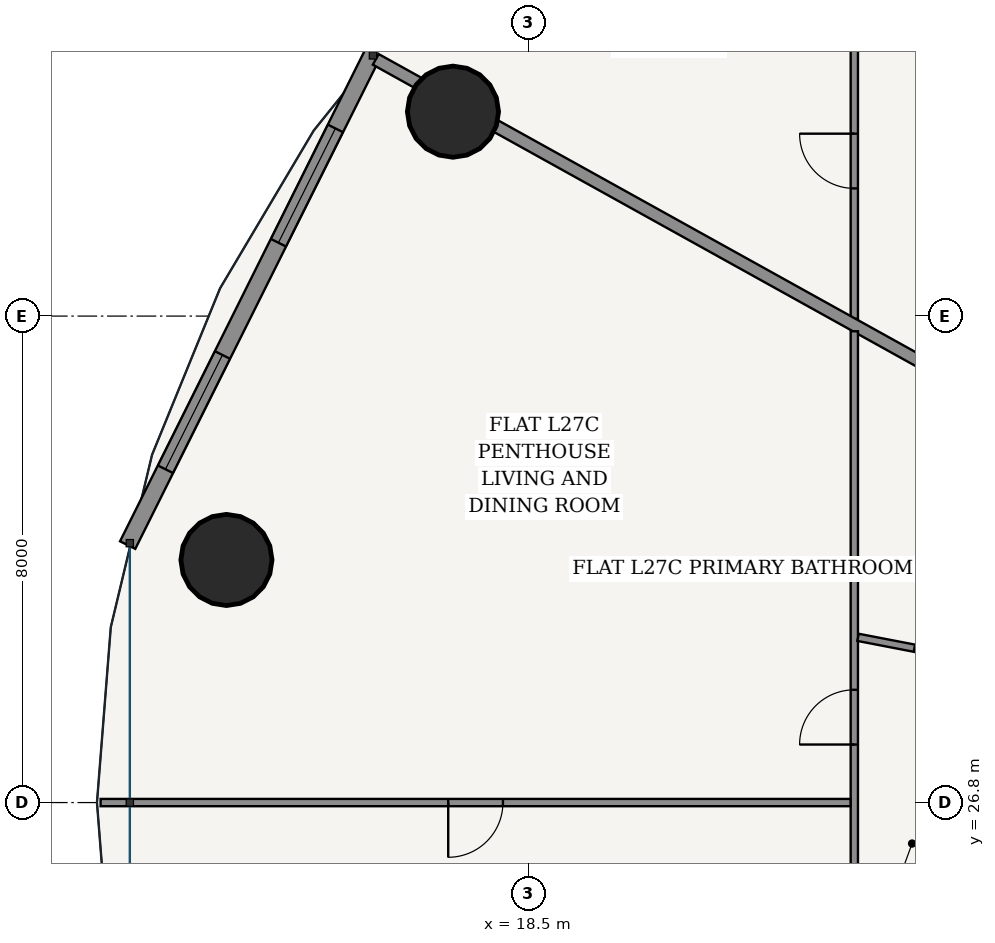
"""IFC4 building model, lengths in metres.
Left out: names, types, materials, properties, quantities, classifications, styles, units other than length and angle.
Written with IfcOpenShell. Run it as: python <this file> out.ifc"""

import sys

from ifc_helpers import new_model, si_unit, direction, frame, frame_2d, origin, origin_2d, place, context, subcontext, project, spatial, rectangle, hollow_circle, extrude, source, transform, mapped, element, fill, save


model = new_model("IFC4")
c1 = context("Model", 3, precision=1e-05, world=origin(), true_north=direction((-0.2419218956, 0.970295726276)))
c2 = subcontext(c1, "Body", "Model", "MODEL_VIEW")
j1 = project(units=[si_unit("LENGTHUNIT", "METRE"), si_unit("PLANEANGLEUNIT", "RADIAN")], contexts=[c1])
p1 = place(None, origin())
s1 = spatial("IfcSite", under=j1, at=p1, CompositionType="ELEMENT")
p2 = place(p1, origin())
s2 = spatial("IfcBuilding", under=s1, at=p2, CompositionType="ELEMENT")
p3 = place(p2, frame((0.0, 0.0, 105.0)))
s3 = spatial("IfcBuildingStorey", under=s2, at=p3, CompositionType="ELEMENT", Elevation=105.0)
for number, where, z_axis, x_axis in (
    (1, (17.255, 38.161, 0.0), (0.0, 0.0, 1.0), (1.0, 0.0, 0.0)),
    (2, (13.529, 30.79, 0.0), (0.0, 0.0, 1.0), (1.0, 0.0, 0.0)),
):
    element("IfcColumn", number, at=place(p3, frame(where, z_axis=z_axis, x_axis=x_axis)), inside=s3, PredefinedType="COLUMN", context=c2, shape_type="SweptSolid", body=[
        extrude(hollow_circle(Radius=0.75, WallThickness=0.045, at=origin_2d()), origin(), (0.0, 0.0, 1.0), 3.6),
    ])
p4 = place(p3, frame((15.944, 39.133, 0.0), z_axis=(0.0, 0.0, 1.0), x_axis=(-0.446263788661, -0.894901464369, 0.0)))
e3 = element("IfcWall", 3, at=p4, inside=s3, PredefinedType="SOLIDWALL", context=c2, shape_type="SweptSolid", body=[
    extrude(rectangle(XDim=9.05, YDim=0.28, at=frame_2d((4.525, 0.0))), origin(), (0.0, 0.0, 1.0), 3.325),
])
p5 = place(p4, frame((1.394, 0.0, 0.85)))
e4 = element("IfcOpeningElement", 4, at=p5, cuts=e3, PredefinedType="OPENING", context=c2, shape_type="SweptSolid", body=[
    extrude(rectangle(XDim=2.1, YDim=1.95, at=frame_2d((1.05, 0.975))), frame((0.0, 0.15, 0.0), z_axis=(0.0, -1.0, 0.0), x_axis=(1.0, 0.0, 0.0)), (0.0, 0.0, 1.0), 0.3),
])
p6 = place(p4, frame((5.557, 0.0, 0.85)))
e5 = element("IfcOpeningElement", 5, at=p6, cuts=e3, PredefinedType="OPENING", context=c2, shape_type="SweptSolid", body=[
    extrude(rectangle(XDim=2.1, YDim=1.95, at=frame_2d((1.05, 0.975))), frame((0.0, 0.15, 0.0), z_axis=(0.0, -1.0, 0.0), x_axis=(1.0, 0.0, 0.0)), (0.0, 0.0, 1.0), 0.3),
])
p7 = place(p3, frame((23.855, 34.754, 0.0), z_axis=(0.0, 0.0, 1.0), x_axis=(0.0, 1.0, 0.0)))
e6 = element("IfcWall", 6, at=p7, inside=s3, PredefinedType="PARTITIONING", context=c2, shape_type="SweptSolid", body=[
    extrude(rectangle(XDim=5.191, YDim=0.12, at=frame_2d((2.595, 0.0))), origin(), (0.0, 0.0, 1.0), 3.004),
])
p8 = place(p7, frame((2.145, 0.0, 0.0)))
e7 = element("IfcOpeningElement", 7, at=p8, cuts=e6, PredefinedType="OPENING", context=c2, shape_type="SweptSolid", body=[
    extrude(rectangle(XDim=0.9, YDim=2.15, at=frame_2d((0.45, 1.075))), frame((0.0, 0.07, 0.0), z_axis=(0.0, -1.0, 0.0), x_axis=(1.0, 0.0, 0.0)), (0.0, 0.0, 1.0), 0.14),
])
p9 = place(p3, frame((26.615, 33.12, 0.0), z_axis=(0.0, 0.0, 1.0), x_axis=(-0.874319192772, 0.485351366692, 0.0)))
e8 = element("IfcWall", 8, at=p9, inside=s3, PredefinedType="PARTITIONING", context=c2, shape_type="SweptSolid", body=[
    extrude(rectangle(XDim=12.158, YDim=0.2, at=frame_2d((6.079, 0.0))), origin(), (0.0, 0.0, 1.0), 2.767),
])
p10 = place(p3, frame((23.855, 19.05, 0.0), z_axis=(0.0, 0.0, 1.0), x_axis=(0.0, 1.0, 0.0)))
e9 = element("IfcWall", 9, at=p10, inside=s3, PredefinedType="PARTITIONING", context=c2, shape_type="SweptSolid", body=[
    extrude(rectangle(XDim=15.501, YDim=0.12, at=frame_2d((7.75, 0.0))), origin(), (0.0, 0.0, 1.0), 2.767),
])
p11 = place(p10, frame((8.705, 0.0, 0.0)))
e10 = element("IfcOpeningElement", 10, at=p11, cuts=e9, PredefinedType="OPENING", context=c2, shape_type="SweptSolid", body=[
    extrude(rectangle(XDim=0.9, YDim=2.15, at=frame_2d((0.45, 1.075))), frame((0.0, 0.07, 0.0), z_axis=(0.0, -1.0, 0.0), x_axis=(1.0, 0.0, 0.0)), (0.0, 0.0, 1.0), 0.14),
])
p12 = place(p10, frame((1.111, 0.0, 0.0)))
e11 = element("IfcOpeningElement", 11, at=p12, cuts=e9, PredefinedType="OPENING", context=c2, shape_type="SweptSolid", body=[
    extrude(rectangle(XDim=0.9, YDim=2.15, at=frame_2d((0.45, 1.075))), frame((0.0, 0.07, 0.0), z_axis=(0.0, -1.0, 0.0), x_axis=(1.0, 0.0, 0.0)), (0.0, 0.0, 1.0), 0.14),
])
p13 = place(p3, frame((23.793, 26.8, 0.0), z_axis=(0.0, 0.0, 1.0), x_axis=(-1.0, 0.0, 0.0)))
e12 = element("IfcWall", 12, at=p13, inside=s3, PredefinedType="PARTITIONING", context=c2, shape_type="SweptSolid", body=[
    extrude(rectangle(XDim=12.333, YDim=0.12, at=frame_2d((6.167, 0.0))), origin(), (0.0, 0.0, 1.0), 2.767),
])
p14 = place(p13, frame((5.717, 0.0, 0.0)))
e13 = element("IfcOpeningElement", 13, at=p14, cuts=e12, PredefinedType="OPENING", context=c2, shape_type="SweptSolid", body=[
    extrude(rectangle(XDim=0.9, YDim=2.15, at=frame_2d((0.45, 1.075))), frame((0.0, 0.07, 0.0), z_axis=(0.0, -1.0, 0.0), x_axis=(1.0, 0.0, 0.0)), (0.0, 0.0, 1.0), 0.14),
])
p15 = place(p3, frame((26.615, 28.996, 0.0), z_axis=(0.0, 0.0, 1.0), x_axis=(-0.98189351628, 0.18943368942, 0.0)))
e14 = element("IfcWall", 14, at=p15, inside=s3, PredefinedType="PARTITIONING", context=c2, shape_type="SweptSolid", body=[
    extrude(rectangle(XDim=2.749, YDim=0.12, at=frame_2d((1.375, 0.0))), origin(), (0.0, 0.0, 1.0), 3.325),
])
p16 = place(p15, frame((0.944, 0.0, 0.0)))
e15 = element("IfcOpeningElement", 15, at=p16, cuts=e14, PredefinedType="OPENING", context=c2, shape_type="SweptSolid", body=[
    extrude(rectangle(XDim=0.86, YDim=2.15, at=frame_2d((0.43, 1.075))), frame((0.0, 0.07, 0.0), z_axis=(0.0, -1.0, 0.0), x_axis=(1.0, 0.0, 0.0)), (0.0, 0.0, 1.0), 0.14),
])
m1 = source(origin(), c2, "Body", "SweptSolid", [
    extrude(rectangle(XDim=2.1, YDim=1.95, at=frame_2d((1.05, 0.975))), frame((0.0, 0.03, 0.0), z_axis=(0.0, -1.0, 0.0), x_axis=(1.0, 0.0, 0.0)), (0.0, 0.0, 1.0), 0.06),
])
p17 = place(p5, origin())
e16 = element("IfcWindow", 16, at=p17, inside=s3, PartitioningType="SINGLE_PANEL", PredefinedType="WINDOW", context=c2, shape_type="MappedRepresentation", body=[
    mapped(m1, transform((0.0, 0.0, 0.0), scale=1.0)),
])
fill(e4, e16)
p18 = place(p6, origin())
e17 = element("IfcWindow", 17, at=p18, inside=s3, PartitioningType="SINGLE_PANEL", PredefinedType="WINDOW", context=c2, shape_type="MappedRepresentation", body=[
    mapped(m1, transform((0.0, 0.0, 0.0), scale=1.0)),
])
fill(e5, e17)
m2 = source(origin(), c2, "Body", "SweptSolid", [
    extrude(rectangle(XDim=0.9, YDim=2.15, at=frame_2d((0.45, 1.075))), frame((0.0, 0.025, 0.0), z_axis=(0.0, -1.0, 0.0), x_axis=(1.0, 0.0, 0.0)), (0.0, 0.0, 1.0), 0.05),
])
p19 = place(p8, origin())
e18 = element("IfcDoor", 18, at=p19, inside=s3, OperationType="SINGLE_SWING_RIGHT", PredefinedType="DOOR", context=c2, shape_type="MappedRepresentation", body=[
    mapped(m2, transform((0.0, 0.0, 0.0), scale=1.0)),
])
fill(e7, e18)
m3 = source(origin(), c2, "Body", "SweptSolid", [
    extrude(rectangle(XDim=0.86, YDim=2.15, at=frame_2d((0.43, 1.075))), frame((0.0, 0.025, 0.0), z_axis=(0.0, -1.0, 0.0), x_axis=(1.0, 0.0, 0.0)), (0.0, 0.0, 1.0), 0.05),
])
p20 = place(p16, frame((0.86, 0.0, 0.0), z_axis=(0.0, 0.0, 1.0), x_axis=(-1.0, 0.0, 0.0)))
e19 = element("IfcDoor", 19, at=p20, inside=s3, OperationType="SINGLE_SWING_RIGHT", PredefinedType="DOOR", context=c2, shape_type="MappedRepresentation", body=[
    mapped(m3, transform((0.0, 0.0, 0.0), scale=1.0)),
])
fill(e15, e19)
p21 = place(p11, origin())
e20 = element("IfcDoor", 20, at=p21, inside=s3, OperationType="SINGLE_SWING_LEFT", PredefinedType="DOOR", context=c2, shape_type="MappedRepresentation", body=[
    mapped(m2, transform((0.0, 0.0, 0.0), scale=1.0)),
])
fill(e10, e20)
p22 = place(p14, origin())
e21 = element("IfcDoor", 21, at=p22, inside=s3, OperationType="SINGLE_SWING_RIGHT", PredefinedType="DOOR", context=c2, shape_type="MappedRepresentation", body=[
    mapped(m2, transform((0.0, 0.0, 0.0), scale=1.0)),
])
fill(e13, e21)
save(model, sys.argv[1])
